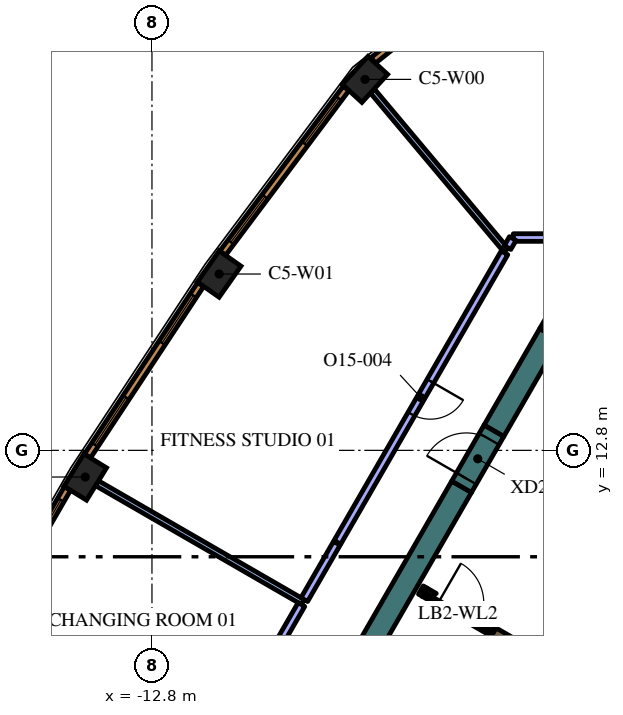
"""IFC4 building model, lengths in metres.
Left out: names, types, materials, properties, quantities, classifications, styles, units other than length and angle.
Written with IfcOpenShell. Run it as: python <this file> out.ifc"""

import sys

from ifc_helpers import new_model, si_unit, direction, frame, frame_2d, origin, origin_2d, place, context, subcontext, project, spatial, polyline, rectangle, outline, extrude, element, fill, save


model = new_model("IFC4")
c1 = context("Model", 3, precision=1e-05, world=origin(), true_north=direction((0.0, 1.0)))
c2 = subcontext(c1, "Body", "Model", "MODEL_VIEW")
j1 = project(units=[si_unit("LENGTHUNIT", "METRE"), si_unit("PLANEANGLEUNIT", "RADIAN")], contexts=[c1])
p1 = place(None, origin())
s1 = spatial("IfcSite", under=j1, at=p1, CompositionType="ELEMENT")
p2 = place(p1, origin())
s2 = spatial("IfcBuilding", under=s1, at=p2, CompositionType="ELEMENT")
p3 = place(p2, frame((0.0, 0.0, 317.4)))
s3 = spatial("IfcBuildingStorey", under=s2, at=p3, CompositionType="ELEMENT", Elevation=317.4)
for number, where, z_axis, x_axis in (
    (1, (-7.195, 22.561, 0.0), (0.0, 0.0, 1.0), (-0.676, -0.737, 0.0)),
    (2, (-11.032, 17.44, 0.0), (0.0, 0.0, 1.0), (-0.575, -0.818, 0.0)),
    (3, (-14.556, 12.098, 0.0), (0.0, 0.0, 1.0), (-0.526, -0.851, 0.0)),
):
    element("IfcColumn", number, at=place(p3, frame(where, z_axis=z_axis, x_axis=x_axis)), inside=s3, PredefinedType="COLUMN", context=c2, shape_type="SweptSolid", body=[
        extrude(rectangle(XDim=1.0, YDim=0.7, at=origin_2d()), origin(), (0.0, 0.0, 1.0), 4.2),
    ])
p4 = place(p3, origin())
e4 = element("IfcWall", 4, at=p4, inside=s3, PredefinedType="SOLIDWALL", context=c2, shape_type="SweptSolid", body=[
    extrude(outline(polyline([(-2.598, 16.0), (-2.26, 16.585), (-2.26, 16.0), (-2.598, 16.0)])), origin(), (0.0, 0.0, 1.0), 4.2),
])
p5 = place(p3, frame((-2.335, 15.855, 0.0), z_axis=(0.0, 0.0, 1.0), x_axis=(-0.499960127962, -0.866048422692, 0.0)))
e5 = element("IfcWall", 5, at=p5, inside=s3, PredefinedType="SOLIDWALL", context=c2, shape_type="SweptSolid", body=[
    extrude(rectangle(XDim=2.934, YDim=0.6, at=frame_2d((1.467, 0.0))), origin(), (0.0, 0.0, 1.0), 4.2),
])
e6 = element("IfcWall", 6, at=p4, inside=s3, PredefinedType="SOLIDWALL", context=c2, shape_type="SweptSolid", body=[
    extrude(outline(polyline([(-1.905, 16.0), (-2.074, 15.707), (-2.581, 16.0), (-1.905, 16.0)])), origin(), (0.0, 0.0, 1.0), 4.2),
])
p6 = place(p3, frame((-12.582, -1.892, 0.0), z_axis=(0.0, 0.0, 1.0), x_axis=(0.500003640647, 0.866023301845, 0.0)))
e7 = element("IfcWall", 7, at=p6, inside=s3, PredefinedType="SOLIDWALL", context=c2, shape_type="SweptSolid", body=[
    extrude(rectangle(XDim=15.858, YDim=0.6, at=frame_2d((7.929, 0.0))), origin(), (0.0, 0.0, 1.0), 4.2),
])
p7 = place(p3, frame((-5.725, 9.125, 0.0), z_axis=(0.0, 0.0, 1.0), x_axis=(0.866185586049, -0.49972245349, 0.0)))
e8 = element("IfcWall", 8, at=p7, inside=s3, PredefinedType="SOLIDWALL", context=c2, shape_type="SweptSolid", body=[
    extrude(rectangle(XDim=0.11, YDim=0.25, at=frame_2d((0.055, 0.0))), origin(), (0.0, 0.0, 1.0), 4.2),
])
p8 = place(p3, frame((-3.066, 7.59, 0.0), z_axis=(0.0, 0.0, 1.0), x_axis=(-0.866081358704, 0.49990307071, 0.0)))
e9 = element("IfcWall", 9, at=p8, inside=s3, PredefinedType="SOLIDWALL", context=c2, shape_type="SweptSolid", body=[
    extrude(rectangle(XDim=0.858, YDim=0.25, at=frame_2d((0.429, 0.0))), origin(), (0.0, 0.0, 1.0), 4.2),
])
e10 = element("IfcWall", 10, at=p4, inside=s3, PredefinedType="SOLIDWALL", context=c2, shape_type="SweptSolid", body=[
    extrude(outline(polyline([(-3.748, 8.128), (-3.813, 8.015), (-4.027, 8.139), (-4.017, 8.156), (-4.008, 8.173), (-4.0, 8.192), (-3.995, 8.21), (-3.991, 8.23), (-3.99, 8.25), (-3.99, 8.268), (-3.748, 8.128)])), origin(), (0.0, 0.0, 1.0), 4.2),
])
e11 = element("IfcWall", 11, at=p4, inside=s3, PredefinedType="SOLIDWALL", context=c2, shape_type="SweptSolid", body=[
    extrude(outline(polyline([(-5.689, 8.96), (-5.69, 8.961), (-5.565, 9.177), (-5.319, 9.035), (-5.335, 9.026), (-5.351, 9.015), (-5.366, 9.002), (-5.379, 8.988), (-5.392, 8.972), (-5.402, 8.956), (-5.412, 8.939), (-5.629, 9.064), (-5.629, 9.064), (-5.689, 8.96)])), origin(), (0.0, 0.0, 1.0), 4.2),
])
p9 = place(p3, frame((-5.659, 9.012, 0.0), z_axis=(0.0, 0.0, 1.0), x_axis=(0.866009402589, -0.500027713859, 0.0)))
e12 = element("IfcWall", 12, at=p9, inside=s3, PredefinedType="PARTITIONING", context=c2, shape_type="SweptSolid", body=[
    extrude(rectangle(XDim=2.1, YDim=0.12, at=frame_2d((1.05, 0.0))), origin(), (0.0, 0.0, 1.0), 3.5),
])
p10 = place(p9, frame((0.45, 0.0, 0.0)))
e13 = element("IfcOpeningElement", 13, at=p10, cuts=e12, PredefinedType="OPENING", context=c2, shape_type="SweptSolid", body=[
    extrude(rectangle(XDim=1.2, YDim=2.1, at=frame_2d((0.6, 1.05))), frame((0.0, 0.07, 0.0), z_axis=(0.0, -1.0, 0.0), x_axis=(1.0, 0.0, 0.0)), (0.0, 0.0, 1.0), 0.14),
])
p11 = place(p3, frame((-4.652, 11.842, 0.0), z_axis=(0.0, 0.0, 1.0), x_axis=(0.500062241894, 0.865989465428, 0.0)))
e14 = element("IfcWall", 14, at=p11, inside=s3, PredefinedType="SOLIDWALL", context=c2, shape_type="SweptSolid", body=[
    extrude(rectangle(XDim=1.7, YDim=0.6, at=frame_2d((0.85, 0.0))), origin(), (0.0, 0.0, 1.0), 4.2),
])
p12 = place(p11, frame((0.25, 0.0, 0.0)))
e15 = element("IfcOpeningElement", 15, at=p12, cuts=e14, PredefinedType="OPENING", context=c2, shape_type="SweptSolid", body=[
    extrude(rectangle(XDim=1.2, YDim=2.1, at=frame_2d((0.6, 1.05))), frame((0.0, 0.31, 0.0), z_axis=(0.0, -1.0, 0.0), x_axis=(1.0, 0.0, 0.0)), (0.0, 0.0, 1.0), 0.62),
])
p13 = place(p3, frame((-3.483, 18.067, 0.0), z_axis=(0.0, 0.0, 1.0), x_axis=(-0.642968046165, 0.765893002717, 0.0)))
e16 = element("IfcWall", 16, at=p13, inside=s3, PredefinedType="PARTITIONING", context=c2, shape_type="SweptSolid", body=[
    extrude(rectangle(XDim=5.47, YDim=0.15, at=frame_2d((2.735, 0.0))), origin(), (0.0, 0.0, 1.0), 3.5),
])
p14 = place(p3, frame((3.261, 18.4, 0.0), z_axis=(0.0, 0.0, 1.0), x_axis=(-1.0, 0.0, 0.0)))
e17 = element("IfcWall", 17, at=p14, inside=s3, PredefinedType="PARTITIONING", context=c2, shape_type="SweptSolid", body=[
    extrude(rectangle(XDim=6.552, YDim=0.2, at=frame_2d((3.276, 0.0))), origin(), (0.0, 0.0, 1.0), 3.5),
])
p15 = place(p14, frame((2.4, 0.0, 0.0)))
e18 = element("IfcOpeningElement", 18, at=p15, cuts=e17, PredefinedType="OPENING", context=c2, shape_type="SweptSolid", body=[
    extrude(rectangle(XDim=1.8, YDim=2.1, at=frame_2d((0.9, 1.05))), frame((0.0, 0.11, 0.0), z_axis=(0.0, -1.0, 0.0), x_axis=(1.0, 0.0, 0.0)), (0.0, 0.0, 1.0), 0.22),
])
p16 = place(p3, frame((-3.306, 18.374, 0.0), z_axis=(0.0, 0.0, 1.0), x_axis=(-0.500055614084, -0.865993292597, 0.0)))
e19 = element("IfcWall", 19, at=p16, inside=s3, PredefinedType="PARTITIONING", context=c2, shape_type="SweptSolid", body=[
    extrude(rectangle(XDim=0.275, YDim=0.2, at=frame_2d((0.137, 0.0))), origin(), (0.0, 0.0, 1.0), 3.5),
])
p17 = place(p3, frame((-8.829, 8.808, 0.0), z_axis=(0.0, 0.0, 1.0), x_axis=(-0.86603673505, 0.499980373158, 0.0)))
e20 = element("IfcWall", 20, at=p17, inside=s3, PredefinedType="PARTITIONING", context=c2, shape_type="SweptSolid", body=[
    extrude(rectangle(XDim=6.255, YDim=0.15, at=frame_2d((3.127, 0.0))), origin(), (0.0, 0.0, 1.0), 3.5),
])
p18 = place(p3, frame((-7.936, 10.355, 0.0), z_axis=(0.0, 0.0, 1.0), x_axis=(-0.500035209441, -0.86600507465, 0.0)))
e21 = element("IfcWall", 21, at=p18, inside=s3, PredefinedType="PARTITIONING", context=c2, shape_type="SweptSolid", body=[
    extrude(rectangle(XDim=1.712, YDim=0.2, at=frame_2d((0.856, 0.0))), origin(), (0.0, 0.0, 1.0), 3.5),
])
p19 = place(p3, frame((-3.523, 17.998, 0.0), z_axis=(0.0, 0.0, 1.0), x_axis=(-0.499996383721, -0.866027491634, 0.0)))
e22 = element("IfcWall", 22, at=p19, inside=s3, PredefinedType="PARTITIONING", context=c2, shape_type="SweptSolid", body=[
    extrude(rectangle(XDim=8.795, YDim=0.2, at=frame_2d((4.397, 0.0))), origin(), (0.0, 0.0, 1.0), 3.5),
])
p20 = place(p19, frame((3.9, 0.0, 0.0)))
e23 = element("IfcOpeningElement", 23, at=p20, cuts=e22, PredefinedType="OPENING", context=c2, shape_type="SweptSolid", body=[
    extrude(rectangle(XDim=1.0, YDim=2.1, at=frame_2d((0.5, 1.05))), frame((0.0, 0.11, 0.0), z_axis=(0.0, -1.0, 0.0), x_axis=(1.0, 0.0, 0.0)), (0.0, 0.0, 1.0), 0.22),
])
p21 = place(p3, frame((-8.867, 8.743, 0.0), z_axis=(0.0, 0.0, 1.0), x_axis=(-0.499978679558, -0.866037712797, 0.0)))
e24 = element("IfcWall", 24, at=p21, inside=s3, PredefinedType="PARTITIONING", context=c2, shape_type="SweptSolid", body=[
    extrude(rectangle(XDim=8.138, YDim=0.2, at=frame_2d((4.069, 0.0))), origin(), (0.0, 0.0, 1.0), 3.5),
])
p22 = place(p21, frame((3.6, 0.0, 0.0)))
e25 = element("IfcOpeningElement", 25, at=p22, cuts=e24, PredefinedType="OPENING", context=c2, shape_type="SweptSolid", body=[
    extrude(rectangle(XDim=1.0, YDim=2.1, at=frame_2d((0.5, 1.05))), frame((0.0, 0.11, 0.0), z_axis=(0.0, -1.0, 0.0), x_axis=(1.0, 0.0, 0.0)), (0.0, 0.0, 1.0), 0.22),
])
p23 = place(p3, frame((-4.448, 25.08, 0.0), z_axis=(0.0, 0.0, 1.0), x_axis=(-0.781626234064, -0.623747088349, 0.0)))
e26 = element("IfcWall", 26, at=p23, inside=s3, PredefinedType="SOLIDWALL", context=c2, shape_type="SweptSolid", body=[
    extrude(rectangle(XDim=3.237, YDim=0.19, at=frame_2d((1.618, 0.0))), origin(), (0.0, 0.0, 1.0), 3.9),
])
p24 = place(p23, frame((1.068, 0.0, 0.6)))
e27 = element("IfcOpeningElement", 27, at=p24, cuts=e26, PredefinedType="OPENING", context=c2, shape_type="SweptSolid", body=[
    extrude(rectangle(XDim=1.1, YDim=2.85, at=frame_2d((0.55, 1.425))), frame((0.0, 0.105, 0.0), z_axis=(0.0, -1.0, 0.0), x_axis=(1.0, 0.0, 0.0)), (0.0, 0.0, 1.0), 0.21),
])
p25 = place(p3, frame((-7.692, 22.324, 0.0), z_axis=(0.0, 0.0, 1.0), x_axis=(-0.599559865294, -0.800329911929, 0.0)))
e28 = element("IfcWall", 28, at=p25, inside=s3, PredefinedType="SOLIDWALL", context=c2, shape_type="SweptSolid", body=[
    extrude(rectangle(XDim=5.415, YDim=0.19, at=frame_2d((2.708, 0.0))), origin(), (0.0, 0.0, 1.0), 3.9),
])
p26 = place(p25, frame((0.323, 0.0, 0.6)))
e29 = element("IfcOpeningElement", 29, at=p26, cuts=e28, PredefinedType="OPENING", context=c2, shape_type="SweptSolid", body=[
    extrude(rectangle(XDim=1.5, YDim=2.85, at=frame_2d((0.75, 1.425))), frame((0.0, 0.105, 0.0), z_axis=(0.0, -1.0, 0.0), x_axis=(1.0, 0.0, 0.0)), (0.0, 0.0, 1.0), 0.21),
])
p27 = place(p25, frame((3.558, 0.0, 0.6)))
e30 = element("IfcOpeningElement", 30, at=p27, cuts=e28, PredefinedType="OPENING", context=c2, shape_type="SweptSolid", body=[
    extrude(rectangle(XDim=1.5, YDim=2.85, at=frame_2d((0.75, 1.425))), frame((0.0, 0.105, 0.0), z_axis=(0.0, -1.0, 0.0), x_axis=(1.0, 0.0, 0.0)), (0.0, 0.0, 1.0), 0.21),
])
p28 = place(p3, frame((-11.518, 17.166, 0.0), z_axis=(0.0, 0.0, 1.0), x_axis=(-0.550744054781, -0.83467417962, 0.0)))
e31 = element("IfcWall", 31, at=p28, inside=s3, PredefinedType="SOLIDWALL", context=c2, shape_type="SweptSolid", body=[
    extrude(rectangle(XDim=5.406, YDim=0.19, at=frame_2d((2.703, 0.0))), origin(), (0.0, 0.0, 1.0), 3.9),
])
p29 = place(p28, frame((0.346, 0.0, 0.6)))
e32 = element("IfcOpeningElement", 32, at=p29, cuts=e31, PredefinedType="OPENING", context=c2, shape_type="SweptSolid", body=[
    extrude(rectangle(XDim=1.5, YDim=2.85, at=frame_2d((0.75, 1.425))), frame((0.0, 0.105, 0.0), z_axis=(0.0, -1.0, 0.0), x_axis=(1.0, 0.0, 0.0)), (0.0, 0.0, 1.0), 0.21),
])
p30 = place(p28, frame((3.559, 0.0, 0.6)))
e33 = element("IfcOpeningElement", 33, at=p30, cuts=e31, PredefinedType="OPENING", context=c2, shape_type="SweptSolid", body=[
    extrude(rectangle(XDim=1.5, YDim=2.85, at=frame_2d((0.75, 1.425))), frame((0.0, 0.105, 0.0), z_axis=(0.0, -1.0, 0.0), x_axis=(1.0, 0.0, 0.0)), (0.0, 0.0, 1.0), 0.21),
])
p31 = place(p3, frame((-15.025, 11.796, 0.0), z_axis=(0.0, 0.0, 1.0), x_axis=(-0.500024767483, -0.866011103799, 0.0)))
e34 = element("IfcWall", 34, at=p31, inside=s3, PredefinedType="SOLIDWALL", context=c2, shape_type="SweptSolid", body=[
    extrude(rectangle(XDim=5.406, YDim=0.19, at=frame_2d((2.703, 0.0))), origin(), (0.0, 0.0, 1.0), 3.9),
])
p32 = place(p31, frame((0.346, 0.0, 0.6)))
e35 = element("IfcOpeningElement", 35, at=p32, cuts=e34, PredefinedType="OPENING", context=c2, shape_type="SweptSolid", body=[
    extrude(rectangle(XDim=1.5, YDim=2.85, at=frame_2d((0.75, 1.425))), frame((0.0, 0.105, 0.0), z_axis=(0.0, -1.0, 0.0), x_axis=(1.0, 0.0, 0.0)), (0.0, 0.0, 1.0), 0.21),
])
p33 = place(p31, frame((3.559, 0.0, 0.6)))
e36 = element("IfcOpeningElement", 36, at=p33, cuts=e34, PredefinedType="OPENING", context=c2, shape_type="SweptSolid", body=[
    extrude(rectangle(XDim=1.5, YDim=2.85, at=frame_2d((0.75, 1.425))), frame((0.0, 0.105, 0.0), z_axis=(0.0, -1.0, 0.0), x_axis=(1.0, 0.0, 0.0)), (0.0, 0.0, 1.0), 0.21),
])
p34 = place(p10, origin())
e37 = element("IfcDoor", 37, at=p34, inside=s3, OperationType="SINGLE_SWING_LEFT", PredefinedType="DOOR", context=c2, shape_type="SweptSolid", body=[
    extrude(rectangle(XDim=1.2, YDim=2.1, at=frame_2d((0.6, 1.05))), frame((0.0, 0.025, 0.0), z_axis=(0.0, -1.0, 0.0), x_axis=(1.0, 0.0, 0.0)), (0.0, 0.0, 1.0), 0.05),
])
fill(e13, e37)
p35 = place(p12, origin())
e38 = element("IfcDoor", 38, at=p35, inside=s3, OperationType="SINGLE_SWING_LEFT", PredefinedType="DOOR", context=c2, shape_type="SweptSolid", body=[
    extrude(rectangle(XDim=1.2, YDim=2.1, at=frame_2d((0.6, 1.05))), frame((0.0, 0.025, 0.0), z_axis=(0.0, -1.0, 0.0), x_axis=(1.0, 0.0, 0.0)), (0.0, 0.0, 1.0), 0.05),
])
fill(e15, e38)
p36 = place(p20, origin())
e39 = element("IfcDoor", 39, at=p36, inside=s3, OperationType="SINGLE_SWING_RIGHT", PredefinedType="DOOR", context=c2, shape_type="SweptSolid", body=[
    extrude(rectangle(XDim=1.0, YDim=2.1, at=frame_2d((0.5, 1.05))), frame((0.0, 0.025, 0.0), z_axis=(0.0, -1.0, 0.0), x_axis=(1.0, 0.0, 0.0)), (0.0, 0.0, 1.0), 0.05),
])
fill(e23, e39)
p37 = place(p26, origin())
e40 = element("IfcWindow", 40, at=p37, inside=s3, PartitioningType="SINGLE_PANEL", PredefinedType="WINDOW", context=c2, shape_type="SweptSolid", body=[
    extrude(rectangle(XDim=1.5, YDim=2.85, at=frame_2d((0.75, 1.425))), frame((0.0, 0.045, 0.0), z_axis=(0.0, -1.0, 0.0), x_axis=(1.0, 0.0, 0.0)), (0.0, 0.0, 1.0), 0.06),
])
fill(e29, e40)
p38 = place(p27, origin())
e41 = element("IfcWindow", 41, at=p38, inside=s3, PartitioningType="SINGLE_PANEL", PredefinedType="WINDOW", context=c2, shape_type="SweptSolid", body=[
    extrude(rectangle(XDim=1.5, YDim=2.85, at=frame_2d((0.75, 1.425))), frame((0.0, 0.045, 0.0), z_axis=(0.0, -1.0, 0.0), x_axis=(1.0, 0.0, 0.0)), (0.0, 0.0, 1.0), 0.06),
])
fill(e30, e41)
p39 = place(p29, origin())
e42 = element("IfcWindow", 42, at=p39, inside=s3, PartitioningType="SINGLE_PANEL", PredefinedType="WINDOW", context=c2, shape_type="SweptSolid", body=[
    extrude(rectangle(XDim=1.5, YDim=2.85, at=frame_2d((0.75, 1.425))), frame((0.0, 0.045, 0.0), z_axis=(0.0, -1.0, 0.0), x_axis=(1.0, 0.0, 0.0)), (0.0, 0.0, 1.0), 0.06),
])
fill(e32, e42)
p40 = place(p30, origin())
e43 = element("IfcWindow", 43, at=p40, inside=s3, PartitioningType="SINGLE_PANEL", PredefinedType="WINDOW", context=c2, shape_type="SweptSolid", body=[
    extrude(rectangle(XDim=1.5, YDim=2.85, at=frame_2d((0.75, 1.425))), frame((0.0, 0.045, 0.0), z_axis=(0.0, -1.0, 0.0), x_axis=(1.0, 0.0, 0.0)), (0.0, 0.0, 1.0), 0.06),
])
fill(e33, e43)
p41 = place(p32, origin())
e44 = element("IfcWindow", 44, at=p41, inside=s3, PartitioningType="SINGLE_PANEL", PredefinedType="WINDOW", context=c2, shape_type="SweptSolid", body=[
    extrude(rectangle(XDim=1.5, YDim=2.85, at=frame_2d((0.75, 1.425))), frame((0.0, 0.045, 0.0), z_axis=(0.0, -1.0, 0.0), x_axis=(1.0, 0.0, 0.0)), (0.0, 0.0, 1.0), 0.06),
])
fill(e35, e44)
save(model, sys.argv[1])
